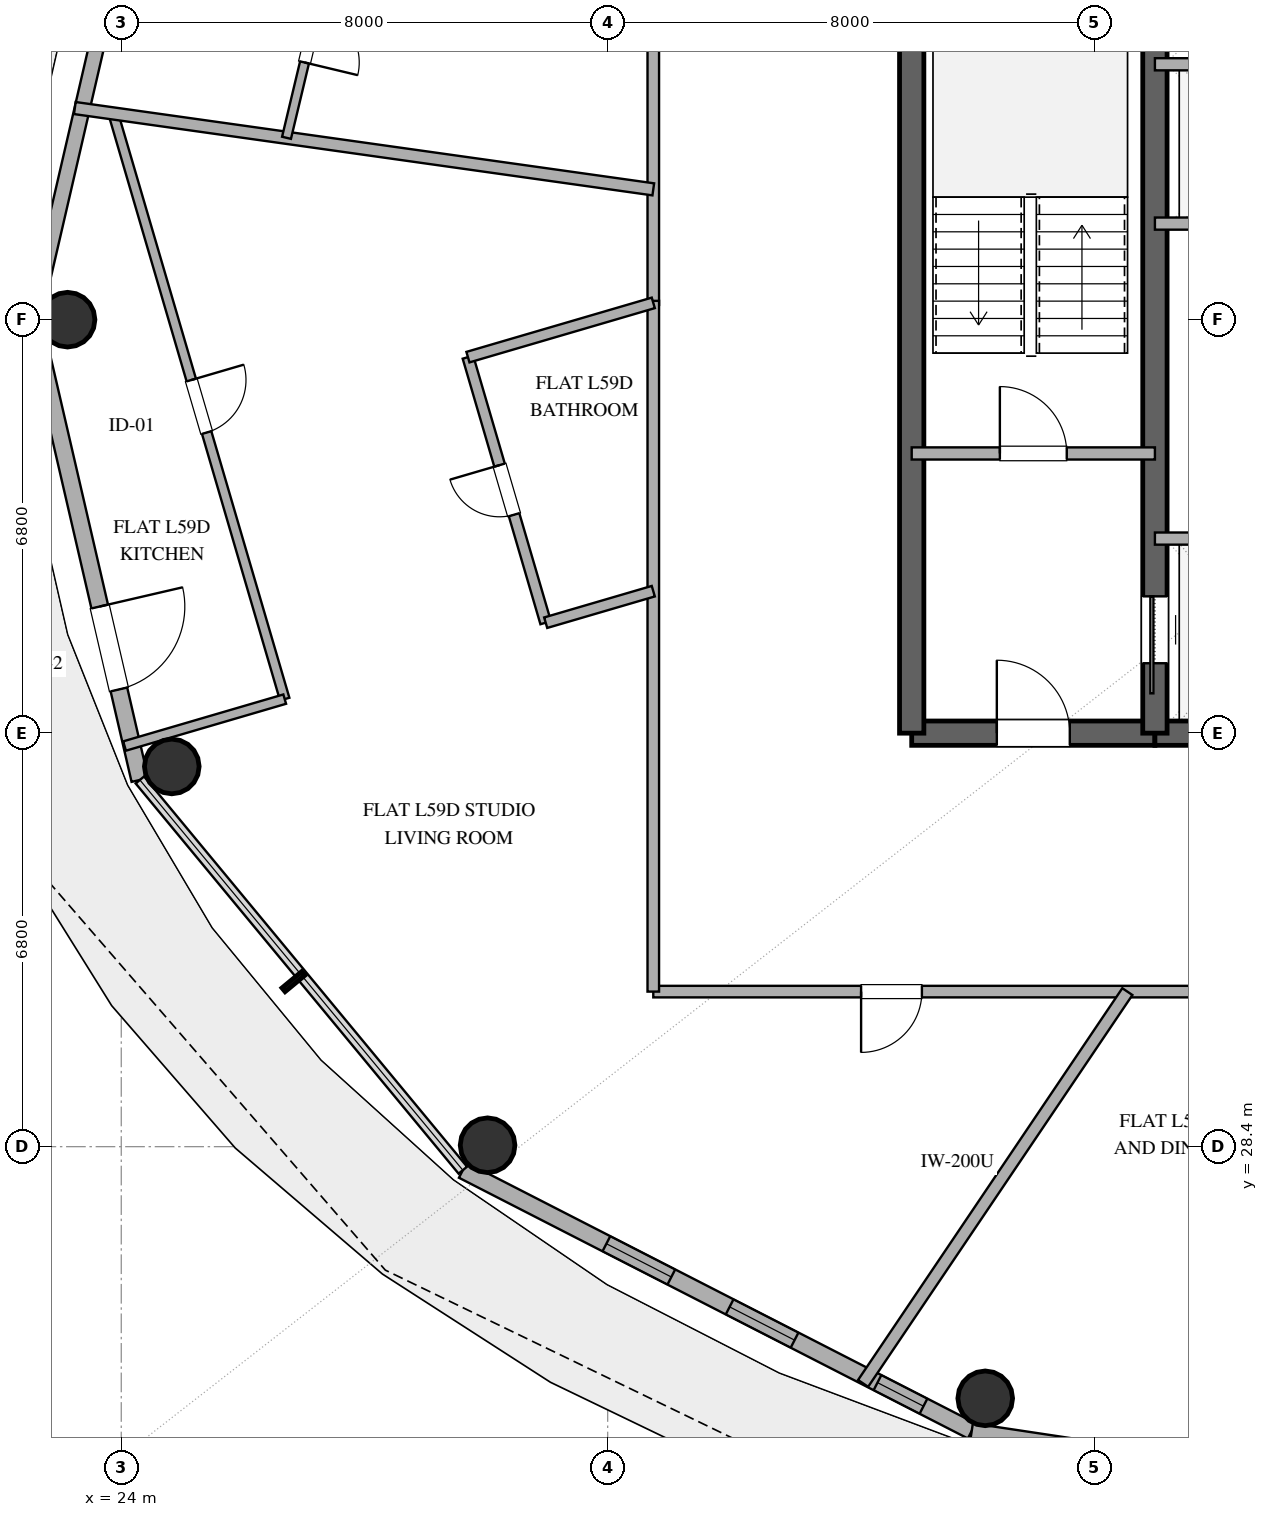
"""IFC4 building model, lengths in metres.
Left out: names, types, materials, properties, quantities, classifications, styles, units other than length and angle.
Written with IfcOpenShell. Run it as: python <this file> out.ifc"""

import sys

from ifc_helpers import new_model, si_unit, direction, frame, frame_2d, origin, origin_2d, place, context, subcontext, project, spatial, rectangle, hollow_circle, extrude, element, fill, save


model = new_model("IFC4")
c1 = context("Model", 3, precision=1e-05, world=origin(), true_north=direction((0.0, 1.0)))
c2 = subcontext(c1, "Body", "Model", "MODEL_VIEW")
j1 = project(units=[si_unit("LENGTHUNIT", "METRE"), si_unit("PLANEANGLEUNIT", "RADIAN")], contexts=[c1])
p1 = place(None, origin())
s1 = spatial("IfcSite", under=j1, at=p1, CompositionType="ELEMENT")
p2 = place(p1, origin())
s2 = spatial("IfcBuilding", under=s1, at=p2, CompositionType="ELEMENT")
p3 = place(p2, frame((0.0, 0.0, 231.6)))
s3 = spatial("IfcBuildingStorey", under=s2, at=p3, CompositionType="ELEMENT", Elevation=231.6)
p4 = place(p3, frame((37.0, 35.2, 0.0), z_axis=(0.0, 0.0, 1.0), x_axis=(1.0, 0.0, 0.0)))
e1 = element("IfcWall", 1, at=p4, inside=s3, PredefinedType="SHEAR", context=c2, shape_type="SweptSolid", body=[
    extrude(rectangle(XDim=4.0, YDim=0.4, at=frame_2d((2.0, 0.0))), origin(), (0.0, 0.0, 1.0), 3.36),
])
p5 = place(p4, frame((1.4, 0.0, 0.0)))
e2 = element("IfcOpeningElement", 2, at=p5, cuts=e1, PredefinedType="OPENING", context=c2, shape_type="SweptSolid", body=[
    extrude(rectangle(XDim=1.2, YDim=2.15, at=frame_2d((0.6, 1.075))), frame((0.0, 0.21, 0.0), z_axis=(0.0, -1.0, 0.0), x_axis=(1.0, 0.0, 0.0)), (0.0, 0.0, 1.0), 0.42),
])
p6 = place(p3, frame((41.0, 35.2, 0.0), z_axis=(0.0, 0.0, 1.0), x_axis=(1.0, 0.0, 0.0)))
e3 = element("IfcWall", 3, at=p6, inside=s3, PredefinedType="SHEAR", context=c2, shape_type="SweptSolid", body=[
    extrude(rectangle(XDim=14.0, YDim=0.4, at=frame_2d((7.0, 0.0))), origin(), (0.0, 0.0, 1.0), 3.36),
])
p7 = place(p6, frame((6.1, 0.0, 0.0)))
e4 = element("IfcOpeningElement", 4, at=p7, cuts=e3, PredefinedType="OPENING", context=c2, shape_type="SweptSolid", body=[
    extrude(rectangle(XDim=1.8, YDim=2.25, at=frame_2d((0.9, 1.125))), frame((0.0, 0.21, 0.0), z_axis=(0.0, -1.0, 0.0), x_axis=(1.0, 0.0, 0.0)), (0.0, 0.0, 1.0), 0.42),
])
p8 = place(p3, frame((37.0, 35.2, 0.0), z_axis=(0.0, 0.0, 1.0), x_axis=(0.0, 1.0, 0.0)))
e5 = element("IfcWall", 5, at=p8, inside=s3, PredefinedType="SHEAR", context=c2, shape_type="SweptSolid", body=[
    extrude(rectangle(XDim=13.6, YDim=0.4, at=frame_2d((6.8, 0.0))), origin(), (0.0, 0.0, 1.0), 3.36),
])
p9 = place(p3, frame((41.0, 35.2, 0.0), z_axis=(0.0, 0.0, 1.0), x_axis=(0.0, 1.0, 0.0)))
e6 = element("IfcWall", 6, at=p9, inside=s3, PredefinedType="SHEAR", context=c2, shape_type="SweptSolid", body=[
    extrude(rectangle(XDim=13.6, YDim=0.4, at=frame_2d((6.8, 0.0))), origin(), (0.0, 0.0, 1.0), 3.36),
])
p10 = place(p9, frame((1.15, 0.0, 0.0)))
e7 = element("IfcOpeningElement", 7, at=p10, cuts=e6, PredefinedType="OPENING", context=c2, shape_type="SweptSolid", body=[
    extrude(rectangle(XDim=1.1, YDim=2.2, at=frame_2d((0.55, 1.1))), frame((0.0, 0.21, 0.0), z_axis=(0.0, -1.0, 0.0), x_axis=(1.0, 0.0, 0.0)), (0.0, 0.0, 1.0), 0.42),
])
for number, where, z_axis, x_axis in (
    (8, (23.117, 42.0, 0.0), (0.0, 0.0, 1.0), (1.0, 0.0, 0.0)),
    (9, (24.831, 34.653, 0.0), (0.0, 0.0, 1.0), (1.0, 0.0, 0.0)),
    (10, (30.025, 28.424, 0.0), (0.0, 0.0, 1.0), (1.0, 0.0, 0.0)),
    (11, (38.209, 24.261, 0.0), (0.0, 0.0, 1.0), (1.0, 0.0, 0.0)),
):
    element("IfcColumn", number, at=place(p3, frame(where, z_axis=z_axis, x_axis=x_axis)), inside=s3, PredefinedType="COLUMN", context=c2, shape_type="SweptSolid", body=[
        extrude(hollow_circle(Radius=0.45, WallThickness=0.025, at=origin_2d()), origin(), (0.0, 0.0, 1.0), 3.36),
    ])
p11 = place(p3, frame((24.306, 49.57, 0.0), z_axis=(0.0, 0.0, 1.0), x_axis=(-0.225635078214, -0.974211892495, 0.0)))
e12 = element("IfcWall", 12, at=p11, inside=s3, PredefinedType="SOLIDWALL", context=c2, shape_type="SweptSolid", body=[
    extrude(rectangle(XDim=7.77, YDim=0.25, at=frame_2d((3.885, 0.0))), origin(), (0.0, 0.0, 1.0), 3.36),
])
p12 = place(p3, frame((22.553, 42.0, 0.0), z_axis=(0.0, 0.0, 1.0), x_axis=(0.225635078214, -0.974211892495, 0.0)))
e13 = element("IfcWall", 13, at=p12, inside=s3, PredefinedType="SOLIDWALL", context=c2, shape_type="SweptSolid", body=[
    extrude(rectangle(XDim=7.77, YDim=0.28, at=frame_2d((3.885, 0.0))), origin(), (0.0, 0.0, 1.0), 3.36),
])
p13 = place(p12, frame((4.842, 0.0, 0.0)))
e14 = element("IfcOpeningElement", 14, at=p13, cuts=e13, PredefinedType="OPENING", context=c2, shape_type="SweptSolid", body=[
    extrude(rectangle(XDim=1.4, YDim=2.2, at=frame_2d((0.7, 1.1))), frame((0.0, 0.15, 0.0), z_axis=(0.0, -1.0, 0.0), x_axis=(1.0, 0.0, 0.0)), (0.0, 0.0, 1.0), 0.3),
])
p14 = place(p3, frame((29.617, 28.013, 0.0), z_axis=(0.0, 0.0, 1.0), x_axis=(0.890007394051, -0.455946091699, 0.0)))
e15 = element("IfcWall", 15, at=p14, inside=s3, PredefinedType="SOLIDWALL", context=c2, shape_type="SweptSolid", body=[
    extrude(rectangle(XDim=9.404, YDim=0.28, at=frame_2d((4.702, 0.0))), origin(), (0.0, 0.0, 1.0), 3.36),
])
p15 = place(p14, frame((2.653, 0.0, 0.85)))
e16 = element("IfcOpeningElement", 16, at=p15, cuts=e15, PredefinedType="OPENING", context=c2, shape_type="SweptSolid", body=[
    extrude(rectangle(XDim=1.2, YDim=1.8, at=frame_2d((0.6, 0.9))), frame((0.0, 0.15, 0.0), z_axis=(0.0, -1.0, 0.0), x_axis=(1.0, 0.0, 0.0)), (0.0, 0.0, 1.0), 0.3),
])
p16 = place(p14, frame((4.93, 0.0, 0.85)))
e17 = element("IfcOpeningElement", 17, at=p16, cuts=e15, PredefinedType="OPENING", context=c2, shape_type="SweptSolid", body=[
    extrude(rectangle(XDim=1.2, YDim=1.8, at=frame_2d((0.6, 0.9))), frame((0.0, 0.15, 0.0), z_axis=(0.0, -1.0, 0.0), x_axis=(1.0, 0.0, 0.0)), (0.0, 0.0, 1.0), 0.3),
])
p17 = place(p14, frame((7.663, 0.0, 0.85)))
e18 = element("IfcOpeningElement", 18, at=p17, cuts=e15, PredefinedType="OPENING", context=c2, shape_type="SweptSolid", body=[
    extrude(rectangle(XDim=0.85, YDim=1.8, at=frame_2d((0.425, 0.9))), frame((0.0, 0.15, 0.0), z_axis=(0.0, -1.0, 0.0), x_axis=(1.0, 0.0, 0.0)), (0.0, 0.0, 1.0), 0.3),
])
p18 = place(p3, frame((37.987, 23.726, 0.0), z_axis=(0.0, 0.0, 1.0), x_axis=(0.988882522213, -0.148698881169, 0.0)))
e19 = element("IfcWall", 19, at=p18, inside=s3, PredefinedType="SOLIDWALL", context=c2, shape_type="SweptSolid", body=[
    extrude(rectangle(XDim=10.125, YDim=0.25, at=frame_2d((5.062, 0.0))), origin(), (0.0, 0.0, 1.0), 3.36),
])
p19 = place(p18, frame((8.259, 0.0, 1.42)))
e20 = element("IfcOpeningElement", 20, at=p19, cuts=e19, PredefinedType="OPENING", context=c2, shape_type="SweptSolid", body=[
    extrude(rectangle(XDim=1.0, YDim=1.05, at=frame_2d((0.5, 0.525))), frame((0.0, 0.135, 0.0), z_axis=(0.0, -1.0, 0.0), x_axis=(1.0, 0.0, 0.0)), (0.0, 0.0, 1.0), 0.27),
])
p20 = place(p3, frame((37.0, 39.8, 0.0), z_axis=(0.0, 0.0, 1.0), x_axis=(1.0, 0.0, 0.0)))
e21 = element("IfcWall", 21, at=p20, inside=s3, PredefinedType="SOLIDWALL", context=c2, shape_type="SweptSolid", body=[
    extrude(rectangle(XDim=4.0, YDim=0.2, at=frame_2d((2.0, 0.0))), origin(), (0.0, 0.0, 1.0), 2.72),
])
p21 = place(p20, frame((1.45, 0.0, 0.0)))
e22 = element("IfcOpeningElement", 22, at=p21, cuts=e21, PredefinedType="OPENING", context=c2, shape_type="SweptSolid", body=[
    extrude(rectangle(XDim=1.1, YDim=2.15, at=frame_2d((0.55, 1.075))), frame((0.0, 0.11, 0.0), z_axis=(0.0, -1.0, 0.0), x_axis=(1.0, 0.0, 0.0)), (0.0, 0.0, 1.0), 0.22),
])
for number, where, z_axis, x_axis in (
    (23, (41.0, 38.4, 0.0), (0.0, 0.0, 1.0), (1.0, 0.0, 0.0)),
    (24, (41.0, 46.2, 0.0), (0.0, 0.0, 1.0), (1.0, 0.0, 0.0)),
    (25, (41.0, 43.58, 0.0), (0.0, 0.0, 1.0), (1.0, 0.0, 0.0)),
):
    element("IfcWall", number, at=place(p3, frame(where, z_axis=z_axis, x_axis=x_axis)), inside=s3, PredefinedType="SOLIDWALL", context=c2, shape_type="SweptSolid", body=[
        extrude(rectangle(XDim=2.95, YDim=0.2, at=frame_2d((1.475, 0.0))), origin(), (0.0, 0.0, 1.0), 2.72),
    ])
p22 = place(p3, frame((23.868, 45.392, 0.0), z_axis=(0.0, 0.0, 1.0), x_axis=(0.281018983641, -0.959702209455, 0.0)))
e26 = element("IfcWall", 26, at=p22, inside=s3, PredefinedType="PLUMBINGWALL", context=c2, shape_type="SweptSolid", body=[
    extrude(rectangle(XDim=10.036, YDim=0.16, at=frame_2d((5.018, 0.0))), origin(), (0.0, 0.0, 1.0), 2.72),
])
p23 = place(p22, frame((4.568, 0.0, 0.0)))
e27 = element("IfcOpeningElement", 27, at=p23, cuts=e26, PredefinedType="OPENING", context=c2, shape_type="SweptSolid", body=[
    extrude(rectangle(XDim=0.9, YDim=2.1, at=frame_2d((0.45, 1.05))), frame((0.0, 0.09, 0.0), z_axis=(0.0, -1.0, 0.0), x_axis=(1.0, 0.0, 0.0)), (0.0, 0.0, 1.0), 0.18),
])
p24 = place(p3, frame((32.75, 42.243, 0.0), z_axis=(0.0, 0.0, 1.0), x_axis=(0.0, 1.0, 0.0)))
e28 = element("IfcWall", 28, at=p24, inside=s3, PredefinedType="PARTITIONING", context=c2, shape_type="SweptSolid", body=[
    extrude(rectangle(XDim=10.807, YDim=0.19, at=frame_2d((5.404, 0.0))), origin(), (0.0, 0.0, 1.0), 2.72),
])
p25 = place(p24, frame((5.837, 0.0, 0.0)))
e29 = element("IfcOpeningElement", 29, at=p25, cuts=e28, PredefinedType="OPENING", context=c2, shape_type="SweptSolid", body=[
    extrude(rectangle(XDim=1.0, YDim=2.2, at=frame_2d((0.5, 1.1))), frame((0.0, 0.105, 0.0), z_axis=(0.0, -1.0, 0.0), x_axis=(1.0, 0.0, 0.0)), (0.0, 0.0, 1.0), 0.21),
])
p26 = place(p3, frame((51.226, 30.95, 0.0), z_axis=(0.0, 0.0, 1.0), x_axis=(-1.0, 0.0, 0.0)))
e30 = element("IfcWall", 30, at=p26, inside=s3, PredefinedType="PARTITIONING", context=c2, shape_type="SweptSolid", body=[
    extrude(rectangle(XDim=18.476, YDim=0.19, at=frame_2d((9.238, 0.0))), origin(), (0.0, 0.0, 1.0), 2.72),
])
p27 = place(p26, frame((14.058, 0.0, 0.0)))
e31 = element("IfcOpeningElement", 31, at=p27, cuts=e30, PredefinedType="OPENING", context=c2, shape_type="SweptSolid", body=[
    extrude(rectangle(XDim=1.0, YDim=2.2, at=frame_2d((0.5, 1.1))), frame((0.0, 0.105, 0.0), z_axis=(0.0, -1.0, 0.0), x_axis=(1.0, 0.0, 0.0)), (0.0, 0.0, 1.0), 0.21),
])
p28 = place(p26, frame((6.839, 0.0, 0.0)))
e32 = element("IfcOpeningElement", 32, at=p28, cuts=e30, PredefinedType="OPENING", context=c2, shape_type="SweptSolid", body=[
    extrude(rectangle(XDim=1.0, YDim=2.2, at=frame_2d((0.5, 1.1))), frame((0.0, 0.105, 0.0), z_axis=(0.0, -1.0, 0.0), x_axis=(1.0, 0.0, 0.0)), (0.0, 0.0, 1.0), 0.21),
])
p29 = place(p3, frame((36.201, 24.507, 0.0), z_axis=(0.0, 0.0, 1.0), x_axis=(0.559208454265, 0.8290270832, 0.0)))
e33 = element("IfcWall", 33, at=p29, inside=s3, PredefinedType="PARTITIONING", context=c2, shape_type="SweptSolid", body=[
    extrude(rectangle(XDim=7.771, YDim=0.2, at=frame_2d((3.886, 0.0))), origin(), (0.0, 0.0, 1.0), 2.72),
])
p30 = place(p3, frame((32.75, 30.95, 0.0), z_axis=(0.0, 0.0, 1.0), x_axis=(0.0, 1.0, 0.0)))
e34 = element("IfcWall", 34, at=p30, inside=s3, PredefinedType="PARTITIONING", context=c2, shape_type="SweptSolid", body=[
    extrude(rectangle(XDim=11.36, YDim=0.19, at=frame_2d((5.68, 0.0))), origin(), (0.0, 0.0, 1.0), 2.72),
])
p31 = place(p3, frame((23.237, 45.48, 0.0), z_axis=(0.0, 0.0, 1.0), x_axis=(0.990269661234, -0.139161769316, 0.0)))
e35 = element("IfcWall", 35, at=p31, inside=s3, PredefinedType="PARTITIONING", context=c2, shape_type="SweptSolid", body=[
    extrude(rectangle(XDim=9.607, YDim=0.2, at=frame_2d((4.803, 0.0))), origin(), (0.0, 0.0, 1.0), 2.72),
])
p32 = place(p3, frame((30.98, 37.017, 0.0), z_axis=(0.0, 0.0, 1.0), x_axis=(-0.281021691617, 0.959701416504, 0.0)))
e36 = element("IfcWall", 36, at=p32, inside=s3, PredefinedType="PLUMBINGWALL", context=c2, shape_type="SweptSolid", body=[
    extrude(rectangle(XDim=4.551, YDim=0.18, at=frame_2d((2.275, 0.0))), origin(), (0.0, 0.0, 1.0), 2.72),
])
p33 = place(p32, frame((1.85, 0.0, 0.0)))
e37 = element("IfcOpeningElement", 37, at=p33, cuts=e36, PredefinedType="OPENING", context=c2, shape_type="SweptSolid", body=[
    extrude(rectangle(XDim=0.85, YDim=2.1, at=frame_2d((0.425, 1.05))), frame((0.0, 0.1, 0.0), z_axis=(0.0, -1.0, 0.0), x_axis=(1.0, 0.0, 0.0)), (0.0, 0.0, 1.0), 0.2),
])
p34 = place(p3, frame((27.519, 48.345, 0.0), z_axis=(0.0, 0.0, 1.0), x_axis=(-0.232293676314, -0.97264569497, 0.0)))
e38 = element("IfcWall", 38, at=p34, inside=s3, PredefinedType="PARTITIONING", context=c2, shape_type="SweptSolid", body=[
    extrude(rectangle(XDim=3.448, YDim=0.15, at=frame_2d((1.724, 0.0))), origin(), (0.0, 0.0, 1.0), 2.72),
])
p35 = place(p34, frame((1.274, 0.0, 0.0)))
e39 = element("IfcOpeningElement", 39, at=p35, cuts=e38, PredefinedType="OPENING", context=c2, shape_type="SweptSolid", body=[
    extrude(rectangle(XDim=0.9, YDim=2.1, at=frame_2d((0.45, 1.05))), frame((0.0, 0.085, 0.0), z_axis=(0.0, -1.0, 0.0), x_axis=(1.0, 0.0, 0.0)), (0.0, 0.0, 1.0), 0.17),
])
p36 = place(p3, frame((29.702, 41.384, 0.0), z_axis=(0.0, 0.0, 1.0), x_axis=(0.959705055225, 0.281009264929, 0.0)))
e40 = element("IfcWall", 40, at=p36, inside=s3, PredefinedType="PLUMBINGWALL", context=c2, shape_type="SweptSolid", body=[
    extrude(rectangle(XDim=3.176, YDim=0.18, at=frame_2d((1.588, 0.0))), origin(), (0.0, 0.0, 1.0), 2.72),
])
p37 = place(p3, frame((26.688, 35.76, 0.0), z_axis=(0.0, 0.0, 1.0), x_axis=(-0.959690607454, -0.281058602368, 0.0)))
e41 = element("IfcWall", 41, at=p37, inside=s3, PredefinedType="PLUMBINGWALL", context=c2, shape_type="SweptSolid", body=[
    extrude(rectangle(XDim=2.745, YDim=0.16, at=frame_2d((1.373, 0.0))), origin(), (0.0, 0.0, 1.0), 2.72),
])
p38 = place(p3, frame((32.75, 37.535, 0.0), z_axis=(0.0, 0.0, 1.0), x_axis=(-0.959679055102, -0.281098045527, 0.0)))
e42 = element("IfcWall", 42, at=p38, inside=s3, PredefinedType="PLUMBINGWALL", context=c2, shape_type="SweptSolid", body=[
    extrude(rectangle(XDim=1.844, YDim=0.18, at=frame_2d((0.922, 0.0))), origin(), (0.0, 0.0, 1.0), 2.72),
])
p39 = place(p13, origin())
e43 = element("IfcDoor", 43, at=p39, inside=s3, OperationType="SINGLE_SWING_LEFT", PredefinedType="DOOR", context=c2, shape_type="SweptSolid", body=[
    extrude(rectangle(XDim=1.4, YDim=2.2, at=frame_2d((0.7, 1.1))), frame((0.0, 0.025, 0.0), z_axis=(0.0, -1.0, 0.0), x_axis=(1.0, 0.0, 0.0)), (0.0, 0.0, 1.0), 0.05),
])
fill(e14, e43)
p40 = place(p15, origin())
e44 = element("IfcWindow", 44, at=p40, inside=s3, PartitioningType="SINGLE_PANEL", PredefinedType="WINDOW", context=c2, shape_type="SweptSolid", body=[
    extrude(rectangle(XDim=1.2, YDim=1.8, at=frame_2d((0.6, 0.9))), frame((0.0, 0.03, 0.0), z_axis=(0.0, -1.0, 0.0), x_axis=(1.0, 0.0, 0.0)), (0.0, 0.0, 1.0), 0.06),
])
fill(e16, e44)
p41 = place(p16, origin())
e45 = element("IfcWindow", 45, at=p41, inside=s3, PartitioningType="SINGLE_PANEL", PredefinedType="WINDOW", context=c2, shape_type="SweptSolid", body=[
    extrude(rectangle(XDim=1.2, YDim=1.8, at=frame_2d((0.6, 0.9))), frame((0.0, 0.03, 0.0), z_axis=(0.0, -1.0, 0.0), x_axis=(1.0, 0.0, 0.0)), (0.0, 0.0, 1.0), 0.06),
])
fill(e17, e45)
p42 = place(p17, origin())
e46 = element("IfcWindow", 46, at=p42, inside=s3, PartitioningType="SINGLE_PANEL", PredefinedType="WINDOW", context=c2, shape_type="SweptSolid", body=[
    extrude(rectangle(XDim=0.85, YDim=1.8, at=frame_2d((0.425, 0.9))), frame((0.0, 0.03, 0.0), z_axis=(0.0, -1.0, 0.0), x_axis=(1.0, 0.0, 0.0)), (0.0, 0.0, 1.0), 0.06),
])
fill(e18, e46)
p43 = place(p10, origin())
e47 = element("IfcDoor", 47, at=p43, inside=s3, OperationType="SLIDING_TO_LEFT", PredefinedType="DOOR", context=c2, shape_type="SweptSolid", body=[
    extrude(rectangle(XDim=1.1, YDim=2.2, at=frame_2d((0.55, 1.1))), frame((0.0, 0.025, 0.0), z_axis=(0.0, -1.0, 0.0), x_axis=(1.0, 0.0, 0.0)), (0.0, 0.0, 1.0), 0.05),
])
fill(e7, e47)
p44 = place(p5, origin())
e48 = element("IfcDoor", 48, at=p44, inside=s3, OperationType="SINGLE_SWING_LEFT", PredefinedType="DOOR", context=c2, shape_type="SweptSolid", body=[
    extrude(rectangle(XDim=1.2, YDim=2.15, at=frame_2d((0.6, 1.075))), frame((0.0, 0.025, 0.0), z_axis=(0.0, -1.0, 0.0), x_axis=(1.0, 0.0, 0.0)), (0.0, 0.0, 1.0), 0.05),
])
fill(e2, e48)
p45 = place(p21, origin())
e49 = element("IfcDoor", 49, at=p45, inside=s3, OperationType="SINGLE_SWING_LEFT", PredefinedType="DOOR", context=c2, shape_type="SweptSolid", body=[
    extrude(rectangle(XDim=1.1, YDim=2.15, at=frame_2d((0.55, 1.075))), frame((0.0, 0.025, 0.0), z_axis=(0.0, -1.0, 0.0), x_axis=(1.0, 0.0, 0.0)), (0.0, 0.0, 1.0), 0.05),
])
fill(e22, e49)
p46 = place(p23, origin())
e50 = element("IfcDoor", 50, at=p46, inside=s3, OperationType="SINGLE_SWING_LEFT", PredefinedType="DOOR", context=c2, shape_type="SweptSolid", body=[
    extrude(rectangle(XDim=0.9, YDim=2.1, at=frame_2d((0.45, 1.05))), frame((0.0, 0.025, 0.0), z_axis=(0.0, -1.0, 0.0), x_axis=(1.0, 0.0, 0.0)), (0.0, 0.0, 1.0), 0.05),
])
fill(e27, e50)
p47 = place(p27, origin())
e51 = element("IfcDoor", 51, at=p47, inside=s3, OperationType="SINGLE_SWING_RIGHT", PredefinedType="DOOR", context=c2, shape_type="SweptSolid", body=[
    extrude(rectangle(XDim=1.0, YDim=2.2, at=frame_2d((0.5, 1.1))), frame((0.0, 0.025, 0.0), z_axis=(0.0, -1.0, 0.0), x_axis=(1.0, 0.0, 0.0)), (0.0, 0.0, 1.0), 0.05),
])
fill(e31, e51)
p48 = place(p33, origin())
e52 = element("IfcDoor", 52, at=p48, inside=s3, OperationType="SINGLE_SWING_RIGHT", PredefinedType="DOOR", context=c2, shape_type="SweptSolid", body=[
    extrude(rectangle(XDim=0.85, YDim=2.1, at=frame_2d((0.425, 1.05))), frame((0.0, 0.025, 0.0), z_axis=(0.0, -1.0, 0.0), x_axis=(1.0, 0.0, 0.0)), (0.0, 0.0, 1.0), 0.05),
])
fill(e37, e52)
p49 = place(p35, origin())
e53 = element("IfcDoor", 53, at=p49, inside=s3, OperationType="SINGLE_SWING_RIGHT", PredefinedType="DOOR", context=c2, shape_type="SweptSolid", body=[
    extrude(rectangle(XDim=0.9, YDim=2.1, at=frame_2d((0.45, 1.05))), frame((0.0, 0.025, 0.0), z_axis=(0.0, -1.0, 0.0), x_axis=(1.0, 0.0, 0.0)), (0.0, 0.0, 1.0), 0.05),
])
fill(e39, e53)
save(model, sys.argv[1])
